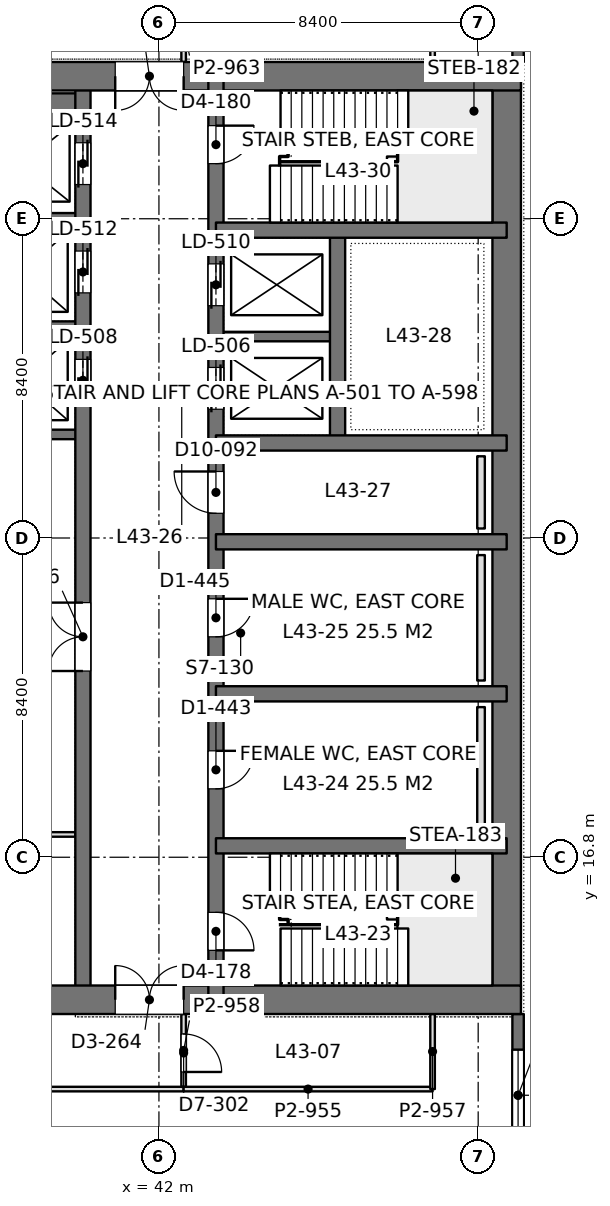
"""IFC4 building model, lengths in metres.
Left out: names, types, materials, properties, quantities, classifications, styles, units other than length and angle.
Written with IfcOpenShell. Run it as: python <this file> out.ifc"""

import sys

from ifc_helpers import new_model, si_unit, direction, frame, frame_2d, origin, place, context, subcontext, project, spatial, rectangle, extrude, element, fill, save


model = new_model("IFC4")
c1 = context("Model", 3, precision=1e-05, world=origin(), true_north=direction((0.0, 1.0)))
c2 = subcontext(c1, "Body", "Model", "MODEL_VIEW")
j1 = project(units=[si_unit("LENGTHUNIT", "METRE"), si_unit("PLANEANGLEUNIT", "RADIAN")], contexts=[c1])
p1 = place(None, origin())
s1 = spatial("IfcSite", under=j1, at=p1, CompositionType="ELEMENT")
p2 = place(p1, origin())
s2 = spatial("IfcBuilding", under=s1, at=p2, CompositionType="ELEMENT")
p3 = place(p2, frame((0.0, 0.0, 190.2)))
s3 = spatial("IfcBuildingStorey", under=s2, at=p3, CompositionType="ELEMENT", Elevation=190.2)
p4 = place(p3, frame((33.675, 13.05, 0.0), z_axis=(0.0, 0.0, 1.0), x_axis=(1.0, 0.0, 0.0)))
e1 = element("IfcWall", 1, at=p4, inside=s3, PredefinedType="SHEAR", context=c2, shape_type="SweptSolid", body=[
    extrude(rectangle(XDim=17.85, YDim=0.75, at=frame_2d((8.925, 0.0))), origin(), (0.0, 0.0, 1.0), 4.2),
])
p5 = place(p4, frame((7.175, 0.0, 0.0)))
e2 = element("IfcOpeningElement", 2, at=p5, cuts=e1, PredefinedType="OPENING", context=c2, shape_type="SweptSolid", body=[
    extrude(rectangle(XDim=1.8, YDim=2.4, at=frame_2d((0.9, 1.2))), frame((0.0, 0.385, 0.0), z_axis=(0.0, -1.0, 0.0), x_axis=(1.0, 0.0, 0.0)), (0.0, 0.0, 1.0), 0.77),
])
p6 = place(p3, frame((33.675, 37.35, 0.0), z_axis=(0.0, 0.0, 1.0), x_axis=(1.0, 0.0, 0.0)))
e3 = element("IfcWall", 3, at=p6, inside=s3, PredefinedType="SHEAR", context=c2, shape_type="SweptSolid", body=[
    extrude(rectangle(XDim=17.85, YDim=0.75, at=frame_2d((8.925, 0.0))), origin(), (0.0, 0.0, 1.0), 4.2),
])
p7 = place(p6, frame((7.175, 0.0, 0.0)))
e4 = element("IfcOpeningElement", 4, at=p7, cuts=e3, PredefinedType="OPENING", context=c2, shape_type="SweptSolid", body=[
    extrude(rectangle(XDim=1.8, YDim=2.4, at=frame_2d((0.9, 1.2))), frame((0.0, 0.385, 0.0), z_axis=(0.0, -1.0, 0.0), x_axis=(1.0, 0.0, 0.0)), (0.0, 0.0, 1.0), 0.77),
])
p8 = place(p3, frame((51.15, 13.05, 0.0), z_axis=(0.0, 0.0, 1.0), x_axis=(0.0, 1.0, 0.0)))
e5 = element("IfcWall", 5, at=p8, inside=s3, PredefinedType="SHEAR", context=c2, shape_type="SweptSolid", body=[
    extrude(rectangle(XDim=24.3, YDim=0.75, at=frame_2d((12.15, 0.0))), origin(), (0.0, 0.0, 1.0), 4.2),
])
p9 = place(p3, frame((43.5, 13.05, 0.0), z_axis=(0.0, 0.0, 1.0), x_axis=(0.0, 1.0, 0.0)))
e6 = element("IfcWall", 6, at=p9, inside=s3, PredefinedType="SHEAR", context=c2, shape_type="SweptSolid", body=[
    extrude(rectangle(XDim=24.3, YDim=0.4, at=frame_2d((12.15, 0.0))), origin(), (0.0, 0.0, 1.0), 4.2),
])
p10 = place(p9, frame((1.3, 0.0, 0.0)))
e7 = element("IfcOpeningElement", 7, at=p10, cuts=e6, PredefinedType="OPENING", context=c2, shape_type="SweptSolid", body=[
    extrude(rectangle(XDim=1.0, YDim=2.2, at=frame_2d((0.5, 1.1))), frame((0.0, 0.21, 0.0), z_axis=(0.0, -1.0, 0.0), x_axis=(1.0, 0.0, 0.0)), (0.0, 0.0, 1.0), 0.42),
])
p11 = place(p9, frame((22.0, 0.0, 0.0)))
e8 = element("IfcOpeningElement", 8, at=p11, cuts=e6, PredefinedType="OPENING", context=c2, shape_type="SweptSolid", body=[
    extrude(rectangle(XDim=1.0, YDim=2.2, at=frame_2d((0.5, 1.1))), frame((0.0, 0.21, 0.0), z_axis=(0.0, -1.0, 0.0), x_axis=(1.0, 0.0, 0.0)), (0.0, 0.0, 1.0), 0.42),
])
p12 = place(p9, frame((5.55, 0.0, 0.0)))
e9 = element("IfcOpeningElement", 9, at=p12, cuts=e6, PredefinedType="OPENING", context=c2, shape_type="SweptSolid", body=[
    extrude(rectangle(XDim=1.0, YDim=2.2, at=frame_2d((0.5, 1.1))), frame((0.0, 0.21, 0.0), z_axis=(0.0, -1.0, 0.0), x_axis=(1.0, 0.0, 0.0)), (0.0, 0.0, 1.0), 0.42),
])
p13 = place(p9, frame((9.55, 0.0, 0.0)))
e10 = element("IfcOpeningElement", 10, at=p13, cuts=e6, PredefinedType="OPENING", context=c2, shape_type="SweptSolid", body=[
    extrude(rectangle(XDim=1.0, YDim=2.2, at=frame_2d((0.5, 1.1))), frame((0.0, 0.21, 0.0), z_axis=(0.0, -1.0, 0.0), x_axis=(1.0, 0.0, 0.0)), (0.0, 0.0, 1.0), 0.42),
])
p14 = place(p9, frame((12.8, 0.0, 0.0)))
e11 = element("IfcOpeningElement", 11, at=p14, cuts=e6, PredefinedType="OPENING", context=c2, shape_type="SweptSolid", body=[
    extrude(rectangle(XDim=1.1, YDim=2.2, at=frame_2d((0.55, 1.1))), frame((0.0, 0.21, 0.0), z_axis=(0.0, -1.0, 0.0), x_axis=(1.0, 0.0, 0.0)), (0.0, 0.0, 1.0), 0.42),
])
p15 = place(p9, frame((15.538, 0.0, 0.0)))
e12 = element("IfcOpeningElement", 12, at=p15, cuts=e6, PredefinedType="OPENING", context=c2, shape_type="SweptSolid", body=[
    extrude(rectangle(XDim=1.1, YDim=2.2, at=frame_2d((0.55, 1.1))), frame((0.0, 0.21, 0.0), z_axis=(0.0, -1.0, 0.0), x_axis=(1.0, 0.0, 0.0)), (0.0, 0.0, 1.0), 0.42),
])
p16 = place(p9, frame((18.262, 0.0, 0.0)))
e13 = element("IfcOpeningElement", 13, at=p16, cuts=e6, PredefinedType="OPENING", context=c2, shape_type="SweptSolid", body=[
    extrude(rectangle(XDim=1.1, YDim=2.2, at=frame_2d((0.55, 1.1))), frame((0.0, 0.21, 0.0), z_axis=(0.0, -1.0, 0.0), x_axis=(1.0, 0.0, 0.0)), (0.0, 0.0, 1.0), 0.42),
])
p17 = place(p3, frame((40.0, 13.05, 0.0), z_axis=(0.0, 0.0, 1.0), x_axis=(0.0, 1.0, 0.0)))
e14 = element("IfcWall", 14, at=p17, inside=s3, PredefinedType="SHEAR", context=c2, shape_type="SweptSolid", body=[
    extrude(rectangle(XDim=24.3, YDim=0.4, at=frame_2d((12.15, 0.0))), origin(), (0.0, 0.0, 1.0), 4.2),
])
p18 = place(p17, frame((15.75, 0.0, 0.0)))
e15 = element("IfcOpeningElement", 15, at=p18, cuts=e14, PredefinedType="OPENING", context=c2, shape_type="SweptSolid", body=[
    extrude(rectangle(XDim=1.1, YDim=2.2, at=frame_2d((0.55, 1.1))), frame((0.0, 0.21, 0.0), z_axis=(0.0, -1.0, 0.0), x_axis=(1.0, 0.0, 0.0)), (0.0, 0.0, 1.0), 0.42),
])
p19 = place(p17, frame((18.6, 0.0, 0.0)))
e16 = element("IfcOpeningElement", 16, at=p19, cuts=e14, PredefinedType="OPENING", context=c2, shape_type="SweptSolid", body=[
    extrude(rectangle(XDim=1.1, YDim=2.2, at=frame_2d((0.55, 1.1))), frame((0.0, 0.21, 0.0), z_axis=(0.0, -1.0, 0.0), x_axis=(1.0, 0.0, 0.0)), (0.0, 0.0, 1.0), 0.42),
])
p20 = place(p17, frame((21.45, 0.0, 0.0)))
e17 = element("IfcOpeningElement", 17, at=p20, cuts=e14, PredefinedType="OPENING", context=c2, shape_type="SweptSolid", body=[
    extrude(rectangle(XDim=1.1, YDim=2.2, at=frame_2d((0.55, 1.1))), frame((0.0, 0.21, 0.0), z_axis=(0.0, -1.0, 0.0), x_axis=(1.0, 0.0, 0.0)), (0.0, 0.0, 1.0), 0.42),
])
p21 = place(p17, frame((8.65, 0.0, 0.0)))
e18 = element("IfcOpeningElement", 18, at=p21, cuts=e14, PredefinedType="OPENING", context=c2, shape_type="SweptSolid", body=[
    extrude(rectangle(XDim=1.8, YDim=2.4, at=frame_2d((0.9, 1.2))), frame((0.0, 0.21, 0.0), z_axis=(0.0, -1.0, 0.0), x_axis=(1.0, 0.0, 0.0)), (0.0, 0.0, 1.0), 0.42),
])
for number, where, z_axis, x_axis in (
    (19, (51.15, 17.1, 0.0), (0.0, 0.0, 1.0), (-1.0, 0.0, 0.0)),
    (20, (51.15, 21.1, 0.0), (0.0, 0.0, 1.0), (-1.0, 0.0, 0.0)),
    (21, (51.15, 25.1, 0.0), (0.0, 0.0, 1.0), (-1.0, 0.0, 0.0)),
    (22, (51.15, 27.7, 0.0), (0.0, 0.0, 1.0), (-1.0, 0.0, 0.0)),
    (23, (51.15, 33.3, 0.0), (0.0, 0.0, 1.0), (-1.0, 0.0, 0.0)),
):
    element("IfcWall", number, at=place(p3, frame(where, z_axis=z_axis, x_axis=x_axis)), inside=s3, PredefinedType="SHEAR", context=c2, shape_type="SweptSolid", body=[
        extrude(rectangle(XDim=7.65, YDim=0.4, at=frame_2d((3.825, 0.0))), origin(), (0.0, 0.0, 1.0), 4.2),
    ])
p22 = place(p3, frame((46.7, 27.7, 0.0), z_axis=(0.0, 0.0, 1.0), x_axis=(0.0, 1.0, 0.0)))
e24 = element("IfcWall", 24, at=p22, inside=s3, PredefinedType="SHEAR", context=c2, shape_type="SweptSolid", body=[
    extrude(rectangle(XDim=5.6, YDim=0.4, at=frame_2d((2.8, 0.0))), origin(), (0.0, 0.0, 1.0), 4.2),
])
p23 = place(p3, frame((46.7, 30.5, 0.0), z_axis=(0.0, 0.0, 1.0), x_axis=(-1.0, 0.0, 0.0)))
e25 = element("IfcWall", 25, at=p23, inside=s3, PredefinedType="SHEAR", context=c2, shape_type="SweptSolid", body=[
    extrude(rectangle(XDim=3.2, YDim=0.25, at=frame_2d((1.6, 0.0))), origin(), (0.0, 0.0, 1.0), 4.2),
])
p24 = place(p3, frame((40.0, 27.925, 0.0), z_axis=(0.0, 0.0, 1.0), x_axis=(-1.0, 0.0, 0.0)))
e26 = element("IfcWall", 26, at=p24, inside=s3, PredefinedType="SHEAR", context=c2, shape_type="SweptSolid", body=[
    extrude(rectangle(XDim=5.95, YDim=0.25, at=frame_2d((2.975, 0.0))), origin(), (0.0, 0.0, 1.0), 4.2),
])
for number, where, z_axis, x_axis in (
    (27, (40.0, 30.775, 0.0), (0.0, 0.0, 1.0), (-1.0, 0.0, 0.0)),
    (28, (40.0, 33.625, 0.0), (0.0, 0.0, 1.0), (-1.0, 0.0, 0.0)),
):
    element("IfcWall", number, at=place(p3, frame(where, z_axis=z_axis, x_axis=x_axis)), inside=s3, PredefinedType="SHEAR", context=c2, shape_type="SweptSolid", body=[
        extrude(rectangle(XDim=3.2, YDim=0.25, at=frame_2d((1.6, 0.0))), origin(), (0.0, 0.0, 1.0), 4.2),
    ])
p25 = place(p3, frame((40.0, 36.625, 0.0), z_axis=(0.0, 0.0, 1.0), x_axis=(-1.0, 0.0, 0.0)))
e29 = element("IfcWall", 29, at=p25, inside=s3, PredefinedType="SHEAR", context=c2, shape_type="SweptSolid", body=[
    extrude(rectangle(XDim=3.2, YDim=0.55, at=frame_2d((1.6, 0.0))), origin(), (0.0, 0.0, 1.0), 4.2),
])
p26 = place(p3, frame((51.45, 42.0, 0.0), z_axis=(0.0, 0.0, 1.0), x_axis=(0.0, -1.0, 0.0)))
e30 = element("IfcWall", 30, at=p26, inside=s3, PredefinedType="SOLIDWALL", context=c2, shape_type="SweptSolid", body=[
    extrude(rectangle(XDim=4.275, YDim=0.3, at=frame_2d((2.137, 0.0))), origin(), (0.0, 0.0, 1.0), 4.05),
])
p27 = place(p26, frame((0.938, 0.0, 0.9)))
e31 = element("IfcOpeningElement", 31, at=p27, cuts=e30, PredefinedType="OPENING", context=c2, shape_type="SweptSolid", body=[
    extrude(rectangle(XDim=2.4, YDim=1.9, at=frame_2d((1.2, 0.95))), frame((0.0, 0.16, 0.0), z_axis=(0.0, -1.0, 0.0), x_axis=(1.0, 0.0, 0.0)), (0.0, 0.0, 1.0), 0.32),
])
p28 = place(p3, frame((51.45, 12.675, 0.0), z_axis=(0.0, 0.0, 1.0), x_axis=(0.0, -1.0, 0.0)))
e32 = element("IfcWall", 32, at=p28, inside=s3, PredefinedType="SOLIDWALL", context=c2, shape_type="SweptSolid", body=[
    extrude(rectangle(XDim=4.275, YDim=0.3, at=frame_2d((2.138, 0.0))), origin(), (0.0, 0.0, 1.0), 4.05),
])
p29 = place(p28, frame((0.938, 0.0, 0.9)))
e33 = element("IfcOpeningElement", 33, at=p29, cuts=e32, PredefinedType="OPENING", context=c2, shape_type="SweptSolid", body=[
    extrude(rectangle(XDim=2.4, YDim=1.9, at=frame_2d((1.2, 0.95))), frame((0.0, 0.16, 0.0), z_axis=(0.0, -1.0, 0.0), x_axis=(1.0, 0.0, 0.0)), (0.0, 0.0, 1.0), 0.32),
])
p30 = place(p3, frame((33.898, 17.4, 0.0), z_axis=(0.0, 0.0, 1.0), x_axis=(1.0, 0.0, 0.0)))
e34 = element("IfcWall", 34, at=p30, inside=s3, PredefinedType="PARTITIONING", context=c2, shape_type="SweptSolid", body=[
    extrude(rectangle(XDim=5.904, YDim=0.12, at=frame_2d((2.952, 0.0))), origin(), (0.0, 0.0, 1.0), 3.55),
])
p31 = place(p3, frame((1.2, 10.7, 0.0), z_axis=(0.0, 0.0, 1.0), x_axis=(1.0, 0.0, 0.0)))
e35 = element("IfcWall", 35, at=p31, inside=s3, PredefinedType="PARTITIONING", context=c2, shape_type="SweptSolid", body=[
    extrude(rectangle(XDim=41.452, YDim=0.12, at=frame_2d((20.726, 0.0))), origin(), (0.0, 0.0, 1.0), 3.55),
])
p32 = place(p31, frame((7.1, 0.0, 0.0)))
e36 = element("IfcOpeningElement", 36, at=p32, cuts=e35, PredefinedType="OPENING", context=c2, shape_type="SweptSolid", body=[
    extrude(rectangle(XDim=1.8, YDim=2.2, at=frame_2d((0.9, 1.1))), frame((0.0, 0.07, 0.0), z_axis=(0.0, -1.0, 0.0), x_axis=(1.0, 0.0, 0.0)), (0.0, 0.0, 1.0), 0.14),
])
p33 = place(p31, frame((15.1, 0.0, 0.0)))
e37 = element("IfcOpeningElement", 37, at=p33, cuts=e35, PredefinedType="OPENING", context=c2, shape_type="SweptSolid", body=[
    extrude(rectangle(XDim=1.8, YDim=2.2, at=frame_2d((0.9, 1.1))), frame((0.0, 0.07, 0.0), z_axis=(0.0, -1.0, 0.0), x_axis=(1.0, 0.0, 0.0)), (0.0, 0.0, 1.0), 0.14),
])
p34 = place(p31, frame((28.917, 0.0, 0.0)))
e38 = element("IfcOpeningElement", 38, at=p34, cuts=e35, PredefinedType="OPENING", context=c2, shape_type="SweptSolid", body=[
    extrude(rectangle(XDim=1.8, YDim=2.2, at=frame_2d((0.9, 1.1))), frame((0.0, 0.07, 0.0), z_axis=(0.0, -1.0, 0.0), x_axis=(1.0, 0.0, 0.0)), (0.0, 0.0, 1.0), 0.14),
])
p35 = place(p31, frame((34.733, 0.0, 0.0)))
e39 = element("IfcOpeningElement", 39, at=p35, cuts=e35, PredefinedType="OPENING", context=c2, shape_type="SweptSolid", body=[
    extrude(rectangle(XDim=1.8, YDim=2.2, at=frame_2d((0.9, 1.1))), frame((0.0, 0.07, 0.0), z_axis=(0.0, -1.0, 0.0), x_axis=(1.0, 0.0, 0.0)), (0.0, 0.0, 1.0), 0.14),
])
p36 = place(p3, frame((42.65, 10.758, 0.0), z_axis=(0.0, 0.0, 1.0), x_axis=(0.0, 1.0, 0.0)))
e40 = element("IfcWall", 40, at=p36, inside=s3, PredefinedType="PARTITIONING", context=c2, shape_type="SweptSolid", body=[
    extrude(rectangle(XDim=1.918, YDim=0.12, at=frame_2d((0.959, 0.0))), origin(), (0.0, 0.0, 1.0), 4.05),
])
p37 = place(p36, frame((0.392, 0.0, 0.0)))
e41 = element("IfcOpeningElement", 41, at=p37, cuts=e40, PredefinedType="OPENING", context=c2, shape_type="SweptSolid", body=[
    extrude(rectangle(XDim=1.0, YDim=2.4, at=frame_2d((0.5, 1.2))), frame((0.0, 0.07, 0.0), z_axis=(0.0, -1.0, 0.0), x_axis=(1.0, 0.0, 0.0)), (0.0, 0.0, 1.0), 0.14),
])
p38 = place(p3, frame((42.648, 10.7, 0.0), z_axis=(0.0, 0.0, 1.0), x_axis=(1.0, 0.0, 0.0)))
e42 = element("IfcWall", 42, at=p38, inside=s3, PredefinedType="PARTITIONING", context=c2, shape_type="SweptSolid", body=[
    extrude(rectangle(XDim=6.552, YDim=0.12, at=frame_2d((3.276, 0.0))), origin(), (0.0, 0.0, 1.0), 4.05),
])
p39 = place(p3, frame((49.2, 10.7, 0.0), z_axis=(0.0, 0.0, 1.0), x_axis=(0.0, 1.0, 0.0)))
e43 = element("IfcWall", 43, at=p39, inside=s3, PredefinedType="PARTITIONING", context=c2, shape_type="SweptSolid", body=[
    extrude(rectangle(XDim=1.976, YDim=0.12, at=frame_2d((0.988, 0.0))), origin(), (0.0, 0.0, 1.0), 4.05),
])
p40 = place(p3, frame((42.65, 37.724, 0.0), z_axis=(0.0, 0.0, 1.0), x_axis=(0.0, 1.0, 0.0)))
e44 = element("IfcWall", 44, at=p40, inside=s3, PredefinedType="PARTITIONING", context=c2, shape_type="SweptSolid", body=[
    extrude(rectangle(XDim=1.918, YDim=0.12, at=frame_2d((0.959, 0.0))), origin(), (0.0, 0.0, 1.0), 4.05),
])
p41 = place(p40, frame((0.526, 0.0, 0.0)))
e45 = element("IfcOpeningElement", 45, at=p41, cuts=e44, PredefinedType="OPENING", context=c2, shape_type="SweptSolid", body=[
    extrude(rectangle(XDim=1.0, YDim=2.4, at=frame_2d((0.5, 1.2))), frame((0.0, 0.07, 0.0), z_axis=(0.0, -1.0, 0.0), x_axis=(1.0, 0.0, 0.0)), (0.0, 0.0, 1.0), 0.14),
])
p42 = place(p3, frame((49.2, 37.724, 0.0), z_axis=(0.0, 0.0, 1.0), x_axis=(0.0, 1.0, 0.0)))
e46 = element("IfcWall", 46, at=p42, inside=s3, PredefinedType="PARTITIONING", context=c2, shape_type="SweptSolid", body=[
    extrude(rectangle(XDim=1.976, YDim=0.12, at=frame_2d((0.988, 0.0))), origin(), (0.0, 0.0, 1.0), 4.05),
])
for number, where, z_axis, x_axis in (
    (47, (50.475, 17.45, 0.0), (0.0, 0.0, 1.0), (0.0, 1.0, 0.0)),
    (48, (50.475, 21.45, 0.0), (0.0, 0.0, 1.0), (0.0, 1.0, 0.0)),
):
    element("IfcWall", number, at=place(p3, frame(where, z_axis=z_axis, x_axis=x_axis)), inside=s3, PredefinedType="PLUMBINGWALL", context=c2, shape_type="SweptSolid", body=[
        extrude(rectangle(XDim=3.3, YDim=0.2, at=frame_2d((1.65, 0.0))), origin(), (0.0, 0.0, 1.0), 1.2),
    ])
p43 = place(p3, frame((50.475, 25.45, 0.0), z_axis=(0.0, 0.0, 1.0), x_axis=(0.0, 1.0, 0.0)))
e49 = element("IfcWall", 49, at=p43, inside=s3, PredefinedType="PLUMBINGWALL", context=c2, shape_type="SweptSolid", body=[
    extrude(rectangle(XDim=1.9, YDim=0.2, at=frame_2d((0.95, 0.0))), origin(), (0.0, 0.0, 1.0), 1.2),
])
p44 = place(p29, origin())
e50 = element("IfcWindow", 50, at=p44, inside=s3, PartitioningType="SINGLE_PANEL", PredefinedType="WINDOW", context=c2, shape_type="SweptSolid", body=[
    extrude(rectangle(XDim=2.4, YDim=1.9, at=frame_2d((1.2, 0.95))), frame((0.0, 0.03, 0.0), z_axis=(0.0, -1.0, 0.0), x_axis=(1.0, 0.0, 0.0)), (0.0, 0.0, 1.0), 0.06),
])
fill(e33, e50)
p45 = place(p5, origin())
e51 = element("IfcDoor", 51, at=p45, inside=s3, OperationType="DOUBLE_DOOR_SINGLE_SWING", PredefinedType="DOOR", context=c2, shape_type="SweptSolid", body=[
    extrude(rectangle(XDim=1.8, YDim=2.4, at=frame_2d((0.9, 1.2))), frame((0.0, 0.025, 0.0), z_axis=(0.0, -1.0, 0.0), x_axis=(1.0, 0.0, 0.0)), (0.0, 0.0, 1.0), 0.05),
])
fill(e2, e51)
p46 = place(p7, frame((1.8, 0.0, 0.0), z_axis=(0.0, 0.0, 1.0), x_axis=(-1.0, 0.0, 0.0)))
e52 = element("IfcDoor", 52, at=p46, inside=s3, OperationType="DOUBLE_DOOR_SINGLE_SWING", PredefinedType="DOOR", context=c2, shape_type="SweptSolid", body=[
    extrude(rectangle(XDim=1.8, YDim=2.4, at=frame_2d((0.9, 1.2))), frame((0.0, 0.025, 0.0), z_axis=(0.0, -1.0, 0.0), x_axis=(1.0, 0.0, 0.0)), (0.0, 0.0, 1.0), 0.05),
])
fill(e4, e52)
p47 = place(p10, frame((1.0, 0.0, 0.0), z_axis=(0.0, 0.0, 1.0), x_axis=(-1.0, 0.0, 0.0)))
e53 = element("IfcDoor", 53, at=p47, inside=s3, OperationType="SINGLE_SWING_RIGHT", PredefinedType="DOOR", context=c2, shape_type="SweptSolid", body=[
    extrude(rectangle(XDim=1.0, YDim=2.2, at=frame_2d((0.5, 1.1))), frame((0.0, 0.025, 0.0), z_axis=(0.0, -1.0, 0.0), x_axis=(1.0, 0.0, 0.0)), (0.0, 0.0, 1.0), 0.05),
])
fill(e7, e53)
p48 = place(p11, frame((1.0, 0.0, 0.0), z_axis=(0.0, 0.0, 1.0), x_axis=(-1.0, 0.0, 0.0)))
e54 = element("IfcDoor", 54, at=p48, inside=s3, OperationType="SINGLE_SWING_LEFT", PredefinedType="DOOR", context=c2, shape_type="SweptSolid", body=[
    extrude(rectangle(XDim=1.0, YDim=2.2, at=frame_2d((0.5, 1.1))), frame((0.0, 0.025, 0.0), z_axis=(0.0, -1.0, 0.0), x_axis=(1.0, 0.0, 0.0)), (0.0, 0.0, 1.0), 0.05),
])
fill(e8, e54)
p49 = place(p12, frame((1.0, 0.0, 0.0), z_axis=(0.0, 0.0, 1.0), x_axis=(-1.0, 0.0, 0.0)))
e55 = element("IfcDoor", 55, at=p49, inside=s3, OperationType="SINGLE_SWING_LEFT", PredefinedType="DOOR", context=c2, shape_type="SweptSolid", body=[
    extrude(rectangle(XDim=1.0, YDim=2.2, at=frame_2d((0.5, 1.1))), frame((0.0, 0.025, 0.0), z_axis=(0.0, -1.0, 0.0), x_axis=(1.0, 0.0, 0.0)), (0.0, 0.0, 1.0), 0.05),
])
fill(e9, e55)
p50 = place(p13, frame((1.0, 0.0, 0.0), z_axis=(0.0, 0.0, 1.0), x_axis=(-1.0, 0.0, 0.0)))
e56 = element("IfcDoor", 56, at=p50, inside=s3, OperationType="SINGLE_SWING_LEFT", PredefinedType="DOOR", context=c2, shape_type="SweptSolid", body=[
    extrude(rectangle(XDim=1.0, YDim=2.2, at=frame_2d((0.5, 1.1))), frame((0.0, 0.025, 0.0), z_axis=(0.0, -1.0, 0.0), x_axis=(1.0, 0.0, 0.0)), (0.0, 0.0, 1.0), 0.05),
])
fill(e10, e56)
p51 = place(p14, origin())
e57 = element("IfcDoor", 57, at=p51, inside=s3, OperationType="SINGLE_SWING_RIGHT", PredefinedType="DOOR", context=c2, shape_type="SweptSolid", body=[
    extrude(rectangle(XDim=1.1, YDim=2.2, at=frame_2d((0.55, 1.1))), frame((0.0, 0.025, 0.0), z_axis=(0.0, -1.0, 0.0), x_axis=(1.0, 0.0, 0.0)), (0.0, 0.0, 1.0), 0.05),
])
fill(e11, e57)
p52 = place(p18, origin())
e58 = element("IfcDoor", 58, at=p52, inside=s3, OperationType="DOUBLE_DOOR_SLIDING", PredefinedType="DOOR", context=c2, shape_type="SweptSolid", body=[
    extrude(rectangle(XDim=1.1, YDim=2.2, at=frame_2d((0.55, 1.1))), frame((0.0, 0.025, 0.0), z_axis=(0.0, -1.0, 0.0), x_axis=(1.0, 0.0, 0.0)), (0.0, 0.0, 1.0), 0.05),
])
fill(e15, e58)
p53 = place(p19, origin())
e59 = element("IfcDoor", 59, at=p53, inside=s3, OperationType="DOUBLE_DOOR_SLIDING", PredefinedType="DOOR", context=c2, shape_type="SweptSolid", body=[
    extrude(rectangle(XDim=1.1, YDim=2.2, at=frame_2d((0.55, 1.1))), frame((0.0, 0.025, 0.0), z_axis=(0.0, -1.0, 0.0), x_axis=(1.0, 0.0, 0.0)), (0.0, 0.0, 1.0), 0.05),
])
fill(e16, e59)
p54 = place(p20, origin())
e60 = element("IfcDoor", 60, at=p54, inside=s3, OperationType="DOUBLE_DOOR_SLIDING", PredefinedType="DOOR", context=c2, shape_type="SweptSolid", body=[
    extrude(rectangle(XDim=1.1, YDim=2.2, at=frame_2d((0.55, 1.1))), frame((0.0, 0.025, 0.0), z_axis=(0.0, -1.0, 0.0), x_axis=(1.0, 0.0, 0.0)), (0.0, 0.0, 1.0), 0.05),
])
fill(e17, e60)
p55 = place(p15, origin())
e61 = element("IfcDoor", 61, at=p55, inside=s3, OperationType="DOUBLE_DOOR_SLIDING", PredefinedType="DOOR", context=c2, shape_type="SweptSolid", body=[
    extrude(rectangle(XDim=1.1, YDim=2.2, at=frame_2d((0.55, 1.1))), frame((0.0, 0.025, 0.0), z_axis=(0.0, -1.0, 0.0), x_axis=(1.0, 0.0, 0.0)), (0.0, 0.0, 1.0), 0.05),
])
fill(e12, e61)
p56 = place(p16, origin())
e62 = element("IfcDoor", 62, at=p56, inside=s3, OperationType="DOUBLE_DOOR_SLIDING", PredefinedType="DOOR", context=c2, shape_type="SweptSolid", body=[
    extrude(rectangle(XDim=1.1, YDim=2.2, at=frame_2d((0.55, 1.1))), frame((0.0, 0.025, 0.0), z_axis=(0.0, -1.0, 0.0), x_axis=(1.0, 0.0, 0.0)), (0.0, 0.0, 1.0), 0.05),
])
fill(e13, e62)
p57 = place(p21, origin())
e63 = element("IfcDoor", 63, at=p57, inside=s3, OperationType="DOUBLE_DOOR_SINGLE_SWING", PredefinedType="DOOR", context=c2, shape_type="SweptSolid", body=[
    extrude(rectangle(XDim=1.8, YDim=2.4, at=frame_2d((0.9, 1.2))), frame((0.0, 0.025, 0.0), z_axis=(0.0, -1.0, 0.0), x_axis=(1.0, 0.0, 0.0)), (0.0, 0.0, 1.0), 0.05),
])
fill(e18, e63)
p58 = place(p37, frame((1.0, 0.0, 0.0), z_axis=(0.0, 0.0, 1.0), x_axis=(-1.0, 0.0, 0.0)))
e64 = element("IfcDoor", 64, at=p58, inside=s3, OperationType="SINGLE_SWING_RIGHT", PredefinedType="DOOR", context=c2, shape_type="SweptSolid", body=[
    extrude(rectangle(XDim=1.0, YDim=2.4, at=frame_2d((0.5, 1.2))), frame((0.0, 0.025, 0.0), z_axis=(0.0, -1.0, 0.0), x_axis=(1.0, 0.0, 0.0)), (0.0, 0.0, 1.0), 0.05),
])
fill(e41, e64)
save(model, sys.argv[1])
